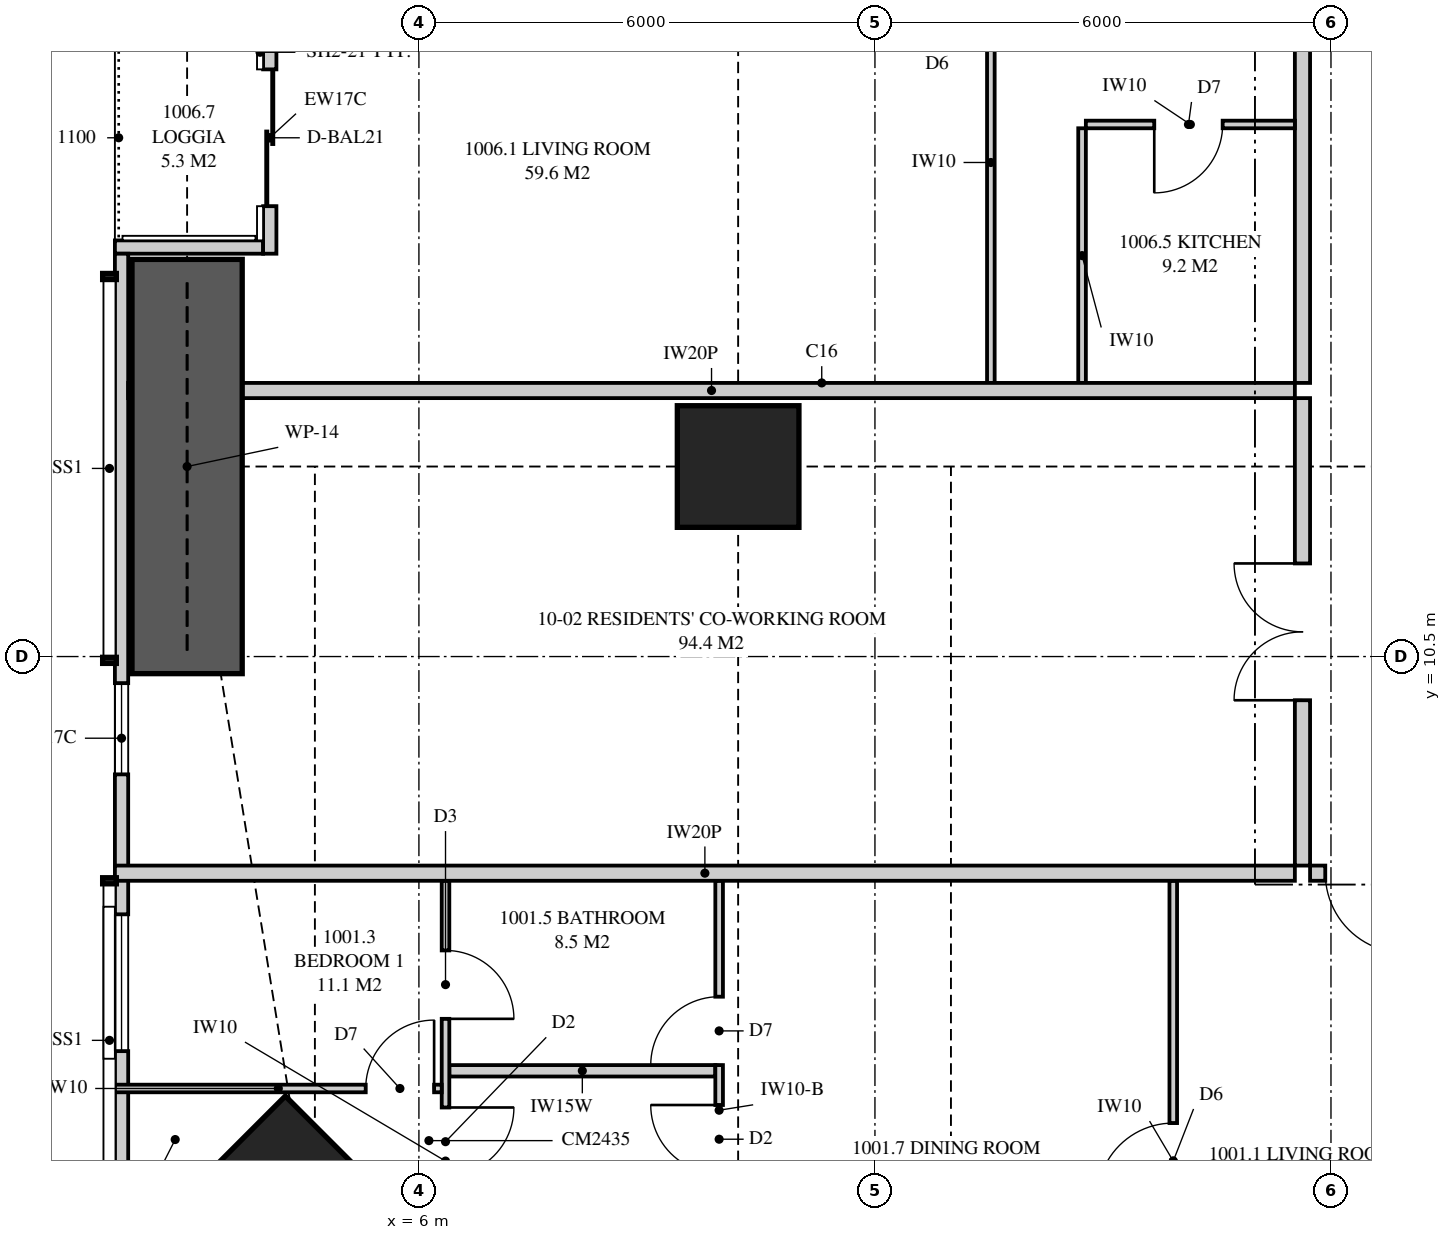
"""IFC4 building model, lengths in metres.
Left out: names, types, materials, properties, quantities, classifications, styles, units other than length and angle.
Written with IfcOpenShell. Run it as: python <this file> out.ifc"""

import sys

from ifc_helpers import new_model, si_unit, direction, frame, frame_2d, origin, origin_2d, place, context, subcontext, project, spatial, polyline, rectangle, outline, extrude, element, fill, save


model = new_model("IFC4")
c1 = context("Model", 3, precision=1e-05, world=origin(), true_north=direction((0.0, 1.0)))
c2 = subcontext(c1, "Body", "Model", "MODEL_VIEW")
j1 = project(units=[si_unit("LENGTHUNIT", "METRE"), si_unit("PLANEANGLEUNIT", "RADIAN")], contexts=[c1])
p1 = place(None, origin())
s1 = spatial("IfcSite", under=j1, at=p1, CompositionType="ELEMENT")
p2 = place(p1, origin())
s2 = spatial("IfcBuilding", under=s1, at=p2, CompositionType="ELEMENT")
p3 = place(p2, frame((0.0, 0.0, 41.1)))
s3 = spatial("IfcBuildingStorey", under=s2, at=p3, CompositionType="ELEMENT", Elevation=41.1)
p4 = place(p3, frame((4.631, 2.631, 0.0), z_axis=(0.0, 0.0, 1.0), x_axis=(0.707106781187, 0.707106781187, 0.0)))
e1 = element("IfcColumn", 1, at=p4, inside=s3, PredefinedType="COLUMN", context=c2, shape_type="SweptSolid", body=[
    extrude(rectangle(XDim=2.4, YDim=3.5, at=origin_2d()), origin(), (0.0, 0.0, 1.0), 3.35),
])
p5 = place(p3, frame((10.2, 13.0, 0.0), z_axis=(0.0, 0.0, 1.0), x_axis=(1.0, 0.0, 0.0)))
e2 = element("IfcColumn", 2, at=p5, inside=s3, PredefinedType="COLUMN", context=c2, shape_type="SweptSolid", body=[
    extrude(rectangle(XDim=1.6, YDim=1.6, at=origin_2d()), origin(), (0.0, 0.0, 1.0), 3.35),
])
p6 = place(p3, frame((2.087, 15.8, 0.0), z_axis=(0.0, 0.0, 1.0), x_axis=(0.0, -1.0, 0.0)))
e3 = element("IfcWall", 3, at=p6, inside=s3, PredefinedType="SOLIDWALL", context=c2, shape_type="SweptSolid", body=[
    extrude(outline(polyline([(0.0, 0.0), (12.749, 0.0), (12.749, 3.11), (3.019, 3.11), (3.019, 2.15), (2.926, 2.15), (2.926, 3.11), (2.8, 3.11), (2.8, 2.15), (0.0, 2.15), (0.0, 0.0)])), frame((0.0, 0.087, 0.0), z_axis=(0.0, -1.0, 0.0), x_axis=(1.0, 0.0, 0.0)), (0.0, 0.0, 1.0), 0.175),
])
p7 = place(p6, frame((5.65, 0.0, 0.4)))
e4 = element("IfcOpeningElement", 4, at=p7, cuts=e3, PredefinedType="OPENING", context=c2, shape_type="SweptSolid", body=[
    extrude(rectangle(XDim=1.2, YDim=1.7, at=frame_2d((0.6, 0.85))), frame((0.0, 0.097, 0.0), z_axis=(0.0, -1.0, 0.0), x_axis=(1.0, 0.0, 0.0)), (0.0, 0.0, 1.0), 0.195),
])
p8 = place(p6, frame((8.691, 0.0, 0.4)))
e5 = element("IfcOpeningElement", 5, at=p8, cuts=e3, PredefinedType="OPENING", context=c2, shape_type="SweptSolid", body=[
    extrude(rectangle(XDim=1.8, YDim=1.7, at=frame_2d((0.9, 0.85))), frame((0.0, 0.097, 0.0), z_axis=(0.0, -1.0, 0.0), x_axis=(1.0, 0.0, 0.0)), (0.0, 0.0, 1.0), 0.195),
])
p9 = place(p3, frame((4.038, 18.85, 0.0), z_axis=(0.0, 0.0, 1.0), x_axis=(0.0, -1.0, 0.0)))
e6 = element("IfcWall", 6, at=p9, inside=s3, PredefinedType="SOLIDWALL", context=c2, shape_type="SweptSolid", body=[
    extrude(rectangle(XDim=3.05, YDim=0.175, at=frame_2d((1.525, 0.0))), origin(), (0.0, 0.0, 1.0), 3.11),
])
p10 = place(p9, frame((0.625, 0.0, 0.0)))
e7 = element("IfcOpeningElement", 7, at=p10, cuts=e6, PredefinedType="OPENING", context=c2, shape_type="SweptSolid", body=[
    extrude(rectangle(XDim=1.8, YDim=2.1, at=frame_2d((0.9, 1.05))), frame((0.0, 0.097, 0.0), z_axis=(0.0, -1.0, 0.0), x_axis=(1.0, 0.0, 0.0)), (0.0, 0.0, 1.0), 0.195),
])
p11 = place(p3, frame((2.0, 15.887, 0.0), z_axis=(0.0, 0.0, 1.0), x_axis=(1.0, 0.0, 0.0)))
e8 = element("IfcWall", 8, at=p11, inside=s3, PredefinedType="SOLIDWALL", context=c2, shape_type="SweptSolid", body=[
    extrude(outline(polyline([(0.0, 0.0), (1.95, 0.0), (1.95, 3.11), (1.75, 3.11), (1.75, 2.15), (0.15, 2.15), (0.15, 3.11), (0.0, 3.11), (0.0, 0.0)])), frame((0.0, 0.087, 0.0), z_axis=(0.0, -1.0, 0.0), x_axis=(1.0, 0.0, 0.0)), (0.0, 0.0, 1.0), 0.175),
])
p12 = place(p3, frame((17.725, 7.65, 0.0), z_axis=(0.0, 0.0, 1.0), x_axis=(1.0, 0.0, 0.0)))
e9 = element("IfcWall", 9, at=p12, inside=s3, PredefinedType="PARTITIONING", context=c2, shape_type="SweptSolid", body=[
    extrude(rectangle(XDim=4.125, YDim=0.2, at=frame_2d((2.062, 0.0))), origin(), (0.0, 0.0, 1.0), 3.11),
])
p13 = place(p12, frame((0.2, 0.0, 0.0)))
e10 = element("IfcOpeningElement", 10, at=p13, cuts=e9, PredefinedType="OPENING", context=c2, shape_type="SweptSolid", body=[
    extrude(rectangle(XDim=1.05, YDim=2.2, at=frame_2d((0.525, 1.1))), frame((0.0, 0.11, 0.0), z_axis=(0.0, -1.0, 0.0), x_axis=(1.0, 0.0, 0.0)), (0.0, 0.0, 1.0), 0.22),
])
p14 = place(p3, frame((6.35, 0.175, 0.0), z_axis=(0.0, 0.0, 1.0), x_axis=(0.0, 1.0, 0.0)))
e11 = element("IfcWall", 11, at=p14, inside=s3, PredefinedType="PARTITIONING", context=c2, shape_type="SweptSolid", body=[
    extrude(outline(polyline([(0.0, 0.0), (7.375, 0.0), (7.375, 3.11), (2.988, 3.11), (2.988, 2.15), (1.234, 2.15), (1.234, 3.11), (0.0, 3.11), (0.0, 0.0)])), frame((0.0, 0.05, 0.0), z_axis=(0.0, -1.0, 0.0), x_axis=(1.0, 0.0, 0.0)), (0.0, 0.0, 1.0), 0.1),
])
p15 = place(p14, frame((3.492, 0.0, 0.0)))
e12 = element("IfcOpeningElement", 12, at=p15, cuts=e11, PredefinedType="OPENING", context=c2, shape_type="SweptSolid", body=[
    extrude(rectangle(XDim=0.9, YDim=2.1, at=frame_2d((0.45, 1.05))), frame((0.0, 0.06, 0.0), z_axis=(0.0, -1.0, 0.0), x_axis=(1.0, 0.0, 0.0)), (0.0, 0.0, 1.0), 0.12),
])
p16 = place(p14, frame((5.559, 0.0, 0.0)))
e13 = element("IfcOpeningElement", 13, at=p16, cuts=e11, PredefinedType="OPENING", context=c2, shape_type="SweptSolid", body=[
    extrude(rectangle(XDim=0.9, YDim=2.1, at=frame_2d((0.45, 1.05))), frame((0.0, 0.06, 0.0), z_axis=(0.0, -1.0, 0.0), x_axis=(1.0, 0.0, 0.0)), (0.0, 0.0, 1.0), 0.12),
])
p17 = place(p3, frame((9.95, 1.513, 0.0), z_axis=(0.0, 0.0, 1.0), x_axis=(0.0, 1.0, 0.0)))
e14 = element("IfcWall", 14, at=p17, inside=s3, PredefinedType="PARTITIONING", context=c2, shape_type="SweptSolid", body=[
    extrude(outline(polyline([(0.0, 0.0), (6.037, 0.0), (6.037, 2.51), (0.927, 2.51), (0.927, 2.15), (0.0, 2.15), (0.0, 0.0)])), frame((0.0, 0.05, 0.0), z_axis=(0.0, -1.0, 0.0), x_axis=(1.0, 0.0, 0.0)), (0.0, 0.0, 1.0), 0.1),
])
p18 = place(p17, frame((2.188, 0.0, 0.0)))
e15 = element("IfcOpeningElement", 15, at=p18, cuts=e14, PredefinedType="OPENING", context=c2, shape_type="SweptSolid", body=[
    extrude(rectangle(XDim=0.9, YDim=2.1, at=frame_2d((0.45, 1.05))), frame((0.0, 0.06, 0.0), z_axis=(0.0, -1.0, 0.0), x_axis=(1.0, 0.0, 0.0)), (0.0, 0.0, 1.0), 0.12),
])
p19 = place(p17, frame((3.612, 0.0, 0.0)))
e16 = element("IfcOpeningElement", 16, at=p19, cuts=e14, PredefinedType="OPENING", context=c2, shape_type="SweptSolid", body=[
    extrude(rectangle(XDim=0.9, YDim=2.1, at=frame_2d((0.45, 1.05))), frame((0.0, 0.06, 0.0), z_axis=(0.0, -1.0, 0.0), x_axis=(1.0, 0.0, 0.0)), (0.0, 0.0, 1.0), 0.12),
])
p20 = place(p3, frame((2.0, 4.817, 0.0), z_axis=(0.0, 0.0, 1.0), x_axis=(1.0, 0.0, 0.0)))
e17 = element("IfcWall", 17, at=p20, inside=s3, PredefinedType="PARTITIONING", context=c2, shape_type="SweptSolid", body=[
    extrude(outline(polyline([(0.0, 0.0), (4.3, 0.0), (4.3, 3.11), (3.148, 3.11), (3.148, 2.15), (1.406, 2.15), (1.406, 3.11), (0.0, 3.11), (0.0, 0.0)])), frame((0.0, 0.05, 0.0), z_axis=(0.0, -1.0, 0.0), x_axis=(1.0, 0.0, 0.0)), (0.0, 0.0, 1.0), 0.1),
])
p21 = place(p20, frame((3.3, 0.0, 0.0)))
e18 = element("IfcOpeningElement", 18, at=p21, cuts=e17, PredefinedType="OPENING", context=c2, shape_type="SweptSolid", body=[
    extrude(rectangle(XDim=0.9, YDim=2.1, at=frame_2d((0.45, 1.05))), frame((0.0, 0.06, 0.0), z_axis=(0.0, -1.0, 0.0), x_axis=(1.0, 0.0, 0.0)), (0.0, 0.0, 1.0), 0.12),
])
p22 = place(p3, frame((6.4, 5.05, 0.0), z_axis=(0.0, 0.0, 1.0), x_axis=(1.0, 0.0, 0.0)))
e19 = element("IfcWall", 19, at=p22, inside=s3, PredefinedType="PLUMBINGWALL", context=c2, shape_type="SweptSolid", body=[
    extrude(outline(polyline([(0.0, 0.0), (3.5, 0.0), (3.5, 3.11), (3.5, 2.51), (2.515, 2.51), (2.515, 3.11), (0.0, 3.11), (0.0, 0.0)])), frame((0.0, 0.075, 0.0), z_axis=(0.0, -1.0, 0.0), x_axis=(1.0, 0.0, 0.0)), (0.0, 0.0, 1.0), 0.15),
])
p23 = place(p3, frame((15.925, 0.175, 0.0), z_axis=(0.0, 0.0, 1.0), x_axis=(0.0, 1.0, 0.0)))
e20 = element("IfcWall", 20, at=p23, inside=s3, PredefinedType="PARTITIONING", context=c2, shape_type="SweptSolid", body=[
    extrude(outline(polyline([(0.0, 0.0), (7.375, 0.0), (7.375, 3.11), (1.635, 3.11), (1.635, 2.15), (0.0, 2.15), (0.0, 3.11), (0.0, 0.0)])), frame((0.0, 0.05, 0.0), z_axis=(0.0, -1.0, 0.0), x_axis=(1.0, 0.0, 0.0)), (0.0, 0.0, 1.0), 0.1),
])
p24 = place(p23, frame((3.188, 0.0, 0.0)))
e21 = element("IfcOpeningElement", 21, at=p24, cuts=e20, PredefinedType="OPENING", context=c2, shape_type="SweptSolid", body=[
    extrude(rectangle(XDim=1.0, YDim=2.1, at=frame_2d((0.5, 1.05))), frame((0.0, 0.06, 0.0), z_axis=(0.0, -1.0, 0.0), x_axis=(1.0, 0.0, 0.0)), (0.0, 0.0, 1.0), 0.12),
])
p25 = place(p3, frame((2.0, 7.65, 0.0), z_axis=(0.0, 0.0, 1.0), x_axis=(1.0, 0.0, 0.0)))
e22 = element("IfcWall", 22, at=p25, inside=s3, PredefinedType="PARTITIONING", context=c2, shape_type="SweptSolid", body=[
    extrude(outline(polyline([(0.0, 0.0), (15.525, 0.0), (15.525, 3.11), (11.337, 3.11), (11.337, 2.541), (10.663, 2.541), (10.663, 3.11), (9.51, 3.11), (9.51, 2.51), (6.89, 2.51), (6.89, 3.11), (2.969, 3.11), (2.969, 2.541), (2.74, 2.541), (2.74, 2.15), (0.896, 2.15), (0.896, 3.11), (0.0, 3.11), (0.0, 0.0)])), frame((0.0, 0.1, 0.0), z_axis=(0.0, -1.0, 0.0), x_axis=(1.0, 0.0, 0.0)), (0.0, 0.0, 1.0), 0.2),
])
p26 = place(p3, frame((2.175, 14.0, 0.0), z_axis=(0.0, 0.0, 1.0), x_axis=(1.0, 0.0, 0.0)))
e23 = element("IfcWall", 23, at=p26, inside=s3, PredefinedType="PARTITIONING", context=c2, shape_type="SweptSolid", body=[
    extrude(outline(polyline([(0.529, 2.15), (0.0, 2.15), (0.0, 0.0), (0.529, 0.0), (0.529, 0.815), (1.021, 0.815), (1.021, 0.0), (15.35, 0.0), (15.35, 3.11), (9.335, 3.11), (9.335, 2.51), (6.715, 2.51), (6.715, 3.11), (1.685, 3.11), (1.685, 2.15), (1.021, 2.15), (1.021, 1.335), (0.529, 1.335), (0.529, 2.15)])), frame((0.0, 0.1, 0.0), z_axis=(0.0, -1.0, 0.0), x_axis=(1.0, 0.0, 0.0)), (0.0, 0.0, 1.0), 0.2),
])
p27 = place(p3, frame((17.625, 7.75, 0.0), z_axis=(0.0, 0.0, 1.0), x_axis=(0.0, 1.0, 0.0)))
e24 = element("IfcWall", 24, at=p27, inside=s3, PredefinedType="PARTITIONING", context=c2, shape_type="SweptSolid", body=[
    extrude(outline(polyline([(0.0, 0.0), (6.15, 0.0), (6.15, 3.11), (5.587, 3.11), (5.587, 2.541), (4.913, 2.541), (4.913, 3.11), (0.0, 3.11), (0.0, 0.0)])), frame((0.0, 0.1, 0.0), z_axis=(0.0, -1.0, 0.0), x_axis=(1.0, 0.0, 0.0)), (0.0, 0.0, 1.0), 0.2),
])
p28 = place(p27, frame((2.175, 0.0, 0.0)))
e25 = element("IfcOpeningElement", 25, at=p28, cuts=e24, PredefinedType="OPENING", context=c2, shape_type="SweptSolid", body=[
    extrude(rectangle(XDim=1.8, YDim=2.1, at=frame_2d((0.9, 1.05))), frame((0.0, 0.11, 0.0), z_axis=(0.0, -1.0, 0.0), x_axis=(1.0, 0.0, 0.0)), (0.0, 0.0, 1.0), 0.22),
])
p29 = place(p3, frame((17.625, 14.1, 0.0), z_axis=(0.0, 0.0, 1.0), x_axis=(0.0, 1.0, 0.0)))
e26 = element("IfcWall", 26, at=p29, inside=s3, PredefinedType="PARTITIONING", context=c2, shape_type="SweptSolid", body=[
    extrude(rectangle(XDim=9.8, YDim=0.2, at=frame_2d((4.9, 0.0))), origin(), (0.0, 0.0, 1.0), 3.11),
])
p30 = place(p29, frame((4.4, 0.0, 0.0)))
e27 = element("IfcOpeningElement", 27, at=p30, cuts=e26, PredefinedType="OPENING", context=c2, shape_type="SweptSolid", body=[
    extrude(rectangle(XDim=1.05, YDim=2.2, at=frame_2d((0.525, 1.1))), frame((0.0, 0.11, 0.0), z_axis=(0.0, -1.0, 0.0), x_axis=(1.0, 0.0, 0.0)), (0.0, 0.0, 1.0), 0.22),
])
p31 = place(p3, frame((13.525, 14.1, 0.0), z_axis=(0.0, 0.0, 1.0), x_axis=(0.0, 1.0, 0.0)))
e28 = element("IfcWall", 28, at=p31, inside=s3, PredefinedType="PARTITIONING", context=c2, shape_type="SweptSolid", body=[
    extrude(rectangle(XDim=5.8, YDim=0.1, at=frame_2d((2.9, 0.0))), origin(), (0.0, 0.0, 1.0), 3.11),
])
p32 = place(p31, frame((4.4, 0.0, 0.0)))
e29 = element("IfcOpeningElement", 29, at=p32, cuts=e28, PredefinedType="OPENING", context=c2, shape_type="SweptSolid", body=[
    extrude(rectangle(XDim=1.0, YDim=2.1, at=frame_2d((0.5, 1.05))), frame((0.0, 0.06, 0.0), z_axis=(0.0, -1.0, 0.0), x_axis=(1.0, 0.0, 0.0)), (0.0, 0.0, 1.0), 0.12),
])
p33 = place(p3, frame((14.725, 14.1, 0.0), z_axis=(0.0, 0.0, 1.0), x_axis=(0.0, 1.0, 0.0)))
e30 = element("IfcWall", 30, at=p33, inside=s3, PredefinedType="PARTITIONING", context=c2, shape_type="SweptSolid", body=[
    extrude(rectangle(XDim=3.35, YDim=0.1, at=frame_2d((1.675, 0.0))), origin(), (0.0, 0.0, 1.0), 3.11),
])
p34 = place(p3, frame((14.775, 17.5, 0.0), z_axis=(0.0, 0.0, 1.0), x_axis=(1.0, 0.0, 0.0)))
e31 = element("IfcWall", 31, at=p34, inside=s3, PredefinedType="PARTITIONING", context=c2, shape_type="SweptSolid", body=[
    extrude(rectangle(XDim=2.75, YDim=0.1, at=frame_2d((1.375, 0.0))), origin(), (0.0, 0.0, 1.0), 3.11),
])
p35 = place(p34, frame((0.9, 0.0, 0.0)))
e32 = element("IfcOpeningElement", 32, at=p35, cuts=e31, PredefinedType="OPENING", context=c2, shape_type="SweptSolid", body=[
    extrude(rectangle(XDim=0.9, YDim=2.1, at=frame_2d((0.45, 1.05))), frame((0.0, 0.06, 0.0), z_axis=(0.0, -1.0, 0.0), x_axis=(1.0, 0.0, 0.0)), (0.0, 0.0, 1.0), 0.12),
])
p36 = place(p3, frame((2.95, 10.275, 0.0), z_axis=(0.0, 0.0, 1.0), x_axis=(0.0, 1.0, 0.0)))
e33 = element("IfcWall", 33, at=p36, inside=s3, PredefinedType="SHEAR", context=c2, shape_type="SweptSolid", body=[
    extrude(rectangle(XDim=5.45, YDim=1.45, at=frame_2d((2.725, 0.0))), origin(), (0.0, 0.0, 1.0), 3.35),
])
p37 = place(p10, origin())
e34 = element("IfcDoor", 34, at=p37, inside=s3, OperationType="SLIDING_TO_LEFT", PredefinedType="DOOR", context=c2, shape_type="SweptSolid", body=[
    extrude(rectangle(XDim=1.8, YDim=2.1, at=frame_2d((0.9, 1.05))), frame((0.0, 0.025, 0.0), z_axis=(0.0, -1.0, 0.0), x_axis=(1.0, 0.0, 0.0)), (0.0, 0.0, 1.0), 0.05),
])
fill(e7, e34)
p38 = place(p7, origin())
e35 = element("IfcWindow", 35, at=p38, inside=s3, PartitioningType="SINGLE_PANEL", PredefinedType="WINDOW", context=c2, shape_type="SweptSolid", body=[
    extrude(rectangle(XDim=1.2, YDim=1.7, at=frame_2d((0.6, 0.85))), frame((0.0, 0.03, 0.0), z_axis=(0.0, -1.0, 0.0), x_axis=(1.0, 0.0, 0.0)), (0.0, 0.0, 1.0), 0.06),
])
fill(e4, e35)
p39 = place(p8, origin())
e36 = element("IfcWindow", 36, at=p39, inside=s3, PartitioningType="SINGLE_PANEL", PredefinedType="WINDOW", context=c2, shape_type="SweptSolid", body=[
    extrude(rectangle(XDim=1.8, YDim=1.7, at=frame_2d((0.9, 0.85))), frame((0.0, 0.03, 0.0), z_axis=(0.0, -1.0, 0.0), x_axis=(1.0, 0.0, 0.0)), (0.0, 0.0, 1.0), 0.06),
])
fill(e5, e36)
p40 = place(p13, frame((1.05, 0.0, 0.0), z_axis=(0.0, 0.0, 1.0), x_axis=(-1.0, 0.0, 0.0)))
e37 = element("IfcDoor", 37, at=p40, inside=s3, OperationType="SINGLE_SWING_LEFT", PredefinedType="DOOR", context=c2, shape_type="SweptSolid", body=[
    extrude(rectangle(XDim=1.05, YDim=2.2, at=frame_2d((0.525, 1.1))), frame((0.0, 0.025, 0.0), z_axis=(0.0, -1.0, 0.0), x_axis=(1.0, 0.0, 0.0)), (0.0, 0.0, 1.0), 0.05),
])
fill(e10, e37)
p41 = place(p21, origin())
e38 = element("IfcDoor", 38, at=p41, inside=s3, OperationType="SINGLE_SWING_RIGHT", PredefinedType="DOOR", context=c2, shape_type="SweptSolid", body=[
    extrude(rectangle(XDim=0.9, YDim=2.1, at=frame_2d((0.45, 1.05))), frame((0.0, 0.025, 0.0), z_axis=(0.0, -1.0, 0.0), x_axis=(1.0, 0.0, 0.0)), (0.0, 0.0, 1.0), 0.05),
])
fill(e18, e38)
p42 = place(p15, frame((0.9, 0.0, 0.0), z_axis=(0.0, 0.0, 1.0), x_axis=(-1.0, 0.0, 0.0)))
e39 = element("IfcDoor", 39, at=p42, inside=s3, OperationType="SINGLE_SWING_LEFT", PredefinedType="DOOR", context=c2, shape_type="SweptSolid", body=[
    extrude(rectangle(XDim=0.9, YDim=2.1, at=frame_2d((0.45, 1.05))), frame((0.0, 0.025, 0.0), z_axis=(0.0, -1.0, 0.0), x_axis=(1.0, 0.0, 0.0)), (0.0, 0.0, 1.0), 0.05),
])
fill(e12, e39)
p43 = place(p18, origin())
e40 = element("IfcDoor", 40, at=p43, inside=s3, OperationType="SINGLE_SWING_RIGHT", PredefinedType="DOOR", context=c2, shape_type="SweptSolid", body=[
    extrude(rectangle(XDim=0.9, YDim=2.1, at=frame_2d((0.45, 1.05))), frame((0.0, 0.025, 0.0), z_axis=(0.0, -1.0, 0.0), x_axis=(1.0, 0.0, 0.0)), (0.0, 0.0, 1.0), 0.05),
])
fill(e15, e40)
p44 = place(p19, origin())
e41 = element("IfcDoor", 41, at=p44, inside=s3, OperationType="SINGLE_SWING_LEFT", PredefinedType="DOOR", context=c2, shape_type="SweptSolid", body=[
    extrude(rectangle(XDim=0.9, YDim=2.1, at=frame_2d((0.45, 1.05))), frame((0.0, 0.025, 0.0), z_axis=(0.0, -1.0, 0.0), x_axis=(1.0, 0.0, 0.0)), (0.0, 0.0, 1.0), 0.05),
])
fill(e16, e41)
p45 = place(p16, frame((0.9, 0.0, 0.0), z_axis=(0.0, 0.0, 1.0), x_axis=(-1.0, 0.0, 0.0)))
e42 = element("IfcDoor", 42, at=p45, inside=s3, OperationType="SINGLE_SWING_RIGHT", PredefinedType="DOOR", context=c2, shape_type="SweptSolid", body=[
    extrude(rectangle(XDim=0.9, YDim=2.1, at=frame_2d((0.45, 1.05))), frame((0.0, 0.025, 0.0), z_axis=(0.0, -1.0, 0.0), x_axis=(1.0, 0.0, 0.0)), (0.0, 0.0, 1.0), 0.05),
])
fill(e13, e42)
p46 = place(p24, origin())
e43 = element("IfcDoor", 43, at=p46, inside=s3, OperationType="SINGLE_SWING_LEFT", PredefinedType="DOOR", context=c2, shape_type="SweptSolid", body=[
    extrude(rectangle(XDim=1.0, YDim=2.1, at=frame_2d((0.5, 1.05))), frame((0.0, 0.025, 0.0), z_axis=(0.0, -1.0, 0.0), x_axis=(1.0, 0.0, 0.0)), (0.0, 0.0, 1.0), 0.05),
])
fill(e21, e43)
p47 = place(p28, origin())
e44 = element("IfcDoor", 44, at=p47, inside=s3, OperationType="DOUBLE_DOOR_SINGLE_SWING", PredefinedType="DOOR", context=c2, shape_type="SweptSolid", body=[
    extrude(rectangle(XDim=1.8, YDim=2.1, at=frame_2d((0.9, 1.05))), frame((0.0, 0.025, 0.0), z_axis=(0.0, -1.0, 0.0), x_axis=(1.0, 0.0, 0.0)), (0.0, 0.0, 1.0), 0.05),
])
fill(e25, e44)
p48 = place(p35, frame((0.9, 0.0, 0.0), z_axis=(0.0, 0.0, 1.0), x_axis=(-1.0, 0.0, 0.0)))
e45 = element("IfcDoor", 45, at=p48, inside=s3, OperationType="SINGLE_SWING_RIGHT", PredefinedType="DOOR", context=c2, shape_type="SweptSolid", body=[
    extrude(rectangle(XDim=0.9, YDim=2.1, at=frame_2d((0.45, 1.05))), frame((0.0, 0.025, 0.0), z_axis=(0.0, -1.0, 0.0), x_axis=(1.0, 0.0, 0.0)), (0.0, 0.0, 1.0), 0.05),
])
fill(e32, e45)
save(model, sys.argv[1])
